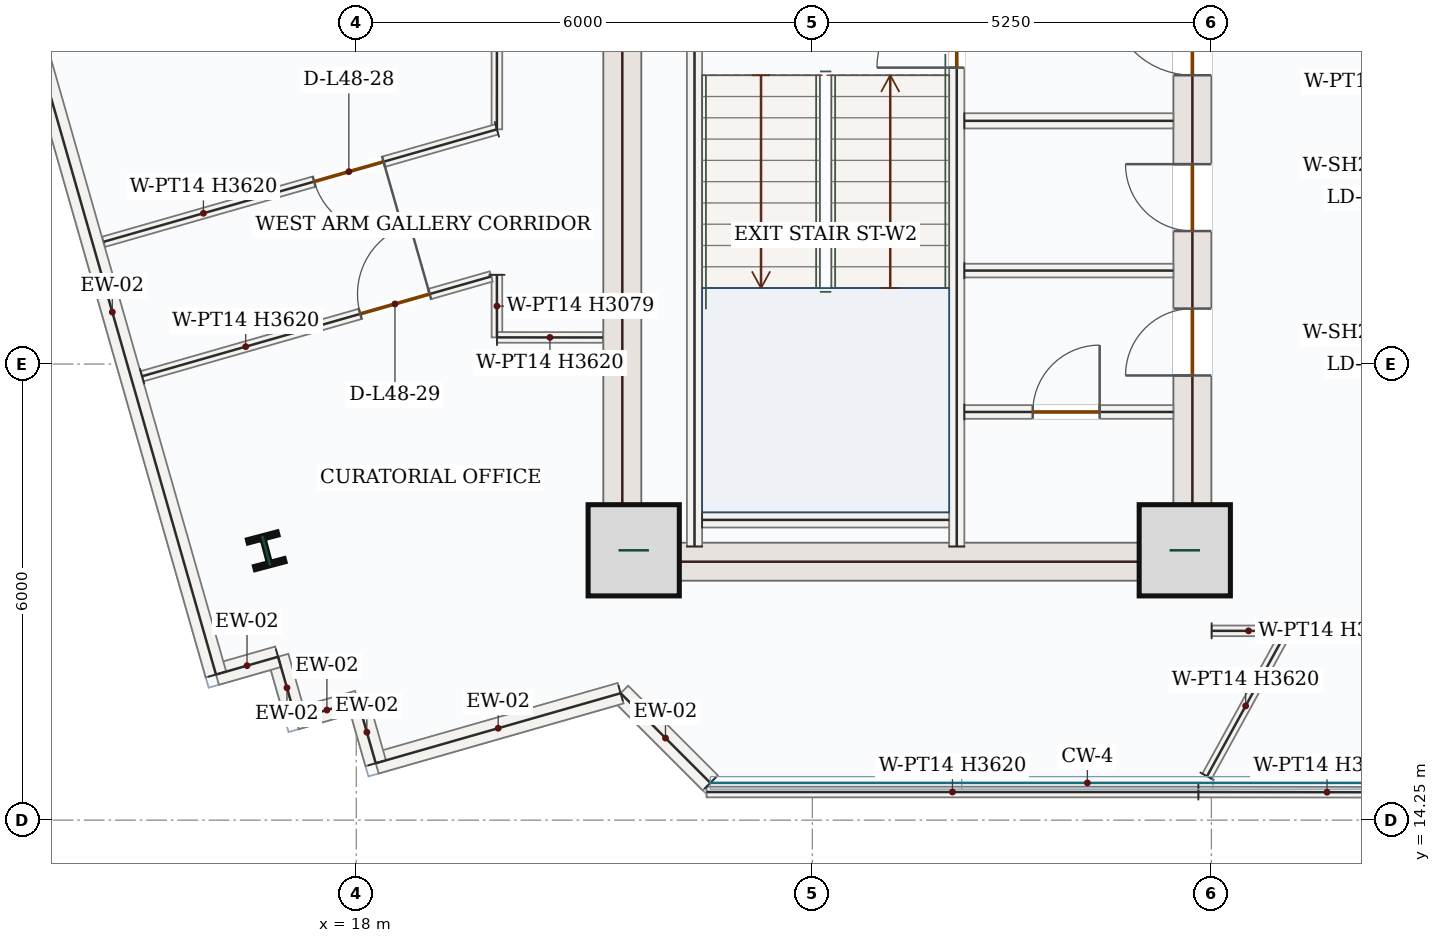
"""IFC4 building model, lengths in metres.
Left out: names, types, materials, properties, quantities, classifications, styles, units other than length and angle.
Written with IfcOpenShell. Run it as: python <this file> out.ifc"""

import sys

from ifc_helpers import new_model, si_unit, direction, frame, frame_2d, origin, origin_2d, place, context, subcontext, project, spatial, rectangle, i_section, extrude, source, transform, mapped, element, fill, save


model = new_model("IFC4")
c1 = context("Model", 3, precision=1e-05, world=origin(), true_north=direction((0.0, 1.0)))
c2 = subcontext(c1, "Body", "Model", "MODEL_VIEW")
j1 = project(units=[si_unit("LENGTHUNIT", "METRE"), si_unit("PLANEANGLEUNIT", "RADIAN")], contexts=[c1])
p1 = place(None, origin())
s1 = spatial("IfcSite", under=j1, at=p1, CompositionType="ELEMENT")
p2 = place(p1, origin())
s2 = spatial("IfcBuilding", under=s1, at=p2, CompositionType="ELEMENT")
p3 = place(p2, frame((0.0, 0.0, 205.8)))
s3 = spatial("IfcBuildingStorey", under=s2, at=p3, CompositionType="ELEMENT", Elevation=205.8)
m1 = source(origin(), c2, "Body", "SweptSolid", [
    extrude(rectangle(XDim=8.55, YDim=0.5, at=frame_2d((4.275, 0.0))), origin(), (0.0, 0.0, 1.0), 3.62),
])
p4 = place(p3, frame((21.5, 17.4, 0.0), z_axis=(0.0, 0.0, 1.0), x_axis=(0.0, 1.0, 0.0)))
e1 = element("IfcWall", 1, at=p4, inside=s3, PredefinedType="SHEAR", context=c2, shape_type="MappedRepresentation", body=[
    mapped(m1, transform((0.0, 0.0, 0.0), x_axis=(1.0, 0.0, 0.0), y_axis=(0.0, 1.0, 0.0), z_axis=(0.0, 0.0, 1.0), scale=1.0)),
])
p5 = place(p3, frame((29.0, 17.4, 0.0), z_axis=(0.0, 0.0, 1.0), x_axis=(0.0, 1.0, 0.0)))
e2 = element("IfcWall", 2, at=p5, inside=s3, PredefinedType="SHEAR", context=c2, shape_type="SweptSolid", body=[
    extrude(rectangle(XDim=8.55, YDim=0.5, at=frame_2d((4.275, 0.0))), origin(), (0.0, 0.0, 1.0), 3.62),
])
p6 = place(p5, frame((6.65, 0.0, 0.0)))
e3 = element("IfcOpeningElement", 3, at=p6, cuts=e2, PredefinedType="OPENING", context=c2, shape_type="SweptSolid", body=[
    extrude(rectangle(XDim=1.1, YDim=2.2, at=frame_2d((0.55, 1.1))), frame((0.0, 0.26, 0.0), z_axis=(0.0, -1.0, 0.0), x_axis=(1.0, 0.0, 0.0)), (0.0, 0.0, 1.0), 0.52),
])
p7 = place(p5, frame((2.7, 0.0, 0.0)))
e4 = element("IfcOpeningElement", 4, at=p7, cuts=e2, PredefinedType="OPENING", context=c2, shape_type="SweptSolid", body=[
    extrude(rectangle(XDim=0.88, YDim=2.1, at=frame_2d((0.44, 1.05))), frame((0.0, 0.26, 0.0), z_axis=(0.0, -1.0, 0.0), x_axis=(1.0, 0.0, 0.0)), (0.0, 0.0, 1.0), 0.52),
])
p8 = place(p5, frame((4.6, 0.0, 0.0)))
e5 = element("IfcOpeningElement", 5, at=p8, cuts=e2, PredefinedType="OPENING", context=c2, shape_type="SweptSolid", body=[
    extrude(rectangle(XDim=0.88, YDim=2.1, at=frame_2d((0.44, 1.05))), frame((0.0, 0.26, 0.0), z_axis=(0.0, -1.0, 0.0), x_axis=(1.0, 0.0, 0.0)), (0.0, 0.0, 1.0), 0.52),
])
m2 = source(origin(), c2, "Body", "SweptSolid", [
    extrude(rectangle(XDim=7.0, YDim=0.5, at=frame_2d((3.5, 0.0))), origin(), (0.0, 0.0, 1.0), 3.62),
])
p9 = place(p3, frame((21.75, 17.65, 0.0), z_axis=(0.0, 0.0, 1.0), x_axis=(1.0, 0.0, 0.0)))
e6 = element("IfcWall", 6, at=p9, inside=s3, PredefinedType="SHEAR", context=c2, shape_type="MappedRepresentation", body=[
    mapped(m2, transform((0.0, 0.0, 0.0), x_axis=(1.0, 0.0, 0.0), y_axis=(0.0, 1.0, 0.0), z_axis=(0.0, 0.0, 1.0), scale=1.0)),
])
m3 = source(origin(), c2, "Body", "SweptSolid", [
    extrude(rectangle(XDim=1.2, YDim=1.2, at=origin_2d()), origin(), (0.0, 0.0, 1.0), 3.9),
])
for number, where, z_axis, x_axis in (
    (7, (21.65, 17.8, 0.0), (0.0, 0.0, 1.0), (1.0, 0.0, 0.0)),
    (8, (28.9, 17.8, 0.0), (0.0, 0.0, 1.0), (1.0, 0.0, 0.0)),
):
    element("IfcColumn", number, at=place(p3, frame(where, z_axis=z_axis, x_axis=x_axis)), inside=s3, PredefinedType="COLUMN", context=c2, shape_type="MappedRepresentation", body=[
        mapped(m3, transform((0.0, 0.0, 0.0), x_axis=(1.0, 0.0, 0.0), y_axis=(0.0, 1.0, 0.0), z_axis=(0.0, 0.0, 1.0), scale=1.0)),
    ])
m4 = source(origin(), c2, "Body", "SweptSolid", [
    extrude(i_section(OverallWidth=0.404, OverallDepth=0.407, WebThickness=0.027, FlangeThickness=0.044, FilletRadius=0.018, at=origin_2d()), origin(), (0.0, 0.0, 1.0), 3.9),
])
p10 = place(p3, frame((16.815, 17.794, 0.0), z_axis=(0.0, 0.0, 1.0), x_axis=(0.966823388604, 0.255445757936, 0.0)))
e9 = element("IfcColumn", 9, at=p10, inside=s3, PredefinedType="COLUMN", context=c2, shape_type="MappedRepresentation", body=[
    mapped(m4, transform((0.0, 0.0, 0.0), x_axis=(1.0, 0.0, 0.0), y_axis=(0.0, 1.0, 0.0), z_axis=(0.0, 0.0, 1.0), scale=1.0)),
])
m5 = source(origin(), c2, "Body", "SweptSolid", [
    extrude(rectangle(XDim=1.669, YDim=0.28, at=frame_2d((0.834, 0.0))), origin(), (0.0, 0.0, 1.0), 3.62),
])
p11 = place(p3, frame((22.658, 14.74, 0.0), z_axis=(0.0, 0.0, 1.0), x_axis=(-0.707106781187, 0.707106781187, 0.0)))
e10 = element("IfcWall", 10, at=p11, inside=s3, PredefinedType="SOLIDWALL", context=c2, shape_type="MappedRepresentation", body=[
    mapped(m5, transform((0.0, 0.0, 0.0), x_axis=(1.0, 0.0, 0.0), y_axis=(0.0, 1.0, 0.0), z_axis=(0.0, 0.0, 1.0), scale=1.0)),
])
m6 = source(origin(), c2, "Body", "SweptSolid", [
    extrude(rectangle(XDim=3.351, YDim=0.28, at=frame_2d((1.676, 0.0))), origin(), (0.0, 0.0, 1.0), 3.62),
])
p12 = place(p3, frame((21.478, 15.92, 0.0), z_axis=(0.0, 0.0, 1.0), x_axis=(-0.961438677319, -0.275019398869, 0.0)))
e11 = element("IfcWall", 11, at=p12, inside=s3, PredefinedType="SOLIDWALL", context=c2, shape_type="MappedRepresentation", body=[
    mapped(m6, transform((0.0, 0.0, 0.0), x_axis=(1.0, 0.0, 0.0), y_axis=(0.0, 1.0, 0.0), z_axis=(0.0, 0.0, 1.0), scale=1.0)),
])
m7 = source(origin(), c2, "Body", "SweptSolid", [
    extrude(rectangle(XDim=0.85, YDim=0.28, at=frame_2d((0.425, 0.0))), origin(), (0.0, 0.0, 1.0), 3.62),
])
p13 = place(p3, frame((18.256, 14.998, 0.0), z_axis=(0.0, 0.0, 1.0), x_axis=(-0.275100375961, 0.961415510144, 0.0)))
e12 = element("IfcWall", 12, at=p13, inside=s3, PredefinedType="SOLIDWALL", context=c2, shape_type="MappedRepresentation", body=[
    mapped(m7, transform((0.0, 0.0, 0.0), x_axis=(1.0, 0.0, 0.0), y_axis=(0.0, 1.0, 0.0), z_axis=(0.0, 0.0, 1.0), scale=1.0)),
])
m8 = source(origin(), c2, "Body", "SweptSolid", [
    extrude(rectangle(XDim=0.85, YDim=0.28, at=frame_2d((0.425, 0.0))), origin(), (0.0, 0.0, 1.0), 3.62),
])
p14 = place(p3, frame((18.022, 15.816, 0.0), z_axis=(0.0, 0.0, 1.0), x_axis=(-0.961393768724, -0.275176346112, 0.0)))
e13 = element("IfcWall", 13, at=p14, inside=s3, PredefinedType="SOLIDWALL", context=c2, shape_type="MappedRepresentation", body=[
    mapped(m8, transform((0.0, 0.0, 0.0), x_axis=(1.0, 0.0, 0.0), y_axis=(0.0, 1.0, 0.0), z_axis=(0.0, 0.0, 1.0), scale=1.0)),
])
p15 = place(p3, frame((17.205, 15.582, 0.0), z_axis=(0.0, 0.0, 1.0), x_axis=(-0.274834915789, 0.961491429532, 0.0)))
e14 = element("IfcWall", 14, at=p15, inside=s3, PredefinedType="SOLIDWALL", context=c2, shape_type="MappedRepresentation", body=[
    mapped(m7, transform((0.0, 0.0, 0.0), x_axis=(1.0, 0.0, 0.0), y_axis=(0.0, 1.0, 0.0), z_axis=(0.0, 0.0, 1.0), scale=1.0)),
])
p16 = place(p3, frame((16.971, 16.399, 0.0), z_axis=(0.0, 0.0, 1.0), x_axis=(-0.961393768724, -0.275176346112, 0.0)))
e15 = element("IfcWall", 15, at=p16, inside=s3, PredefinedType="SOLIDWALL", context=c2, shape_type="MappedRepresentation", body=[
    mapped(m8, transform((0.0, 0.0, 0.0), x_axis=(1.0, 0.0, 0.0), y_axis=(0.0, 1.0, 0.0), z_axis=(0.0, 0.0, 1.0), scale=1.0)),
])
m9 = source(origin(), c2, "Body", "SweptSolid", [
    extrude(rectangle(XDim=9.92, YDim=0.28, at=frame_2d((4.96, 0.0))), origin(), (0.0, 0.0, 1.0), 3.62),
])
p17 = place(p3, frame((16.154, 16.165, 0.0), z_axis=(0.0, 0.0, 1.0), x_axis=(-0.274971401171, 0.961452405758, 0.0)))
e16 = element("IfcWall", 16, at=p17, inside=s3, PredefinedType="SOLIDWALL", context=c2, shape_type="MappedRepresentation", body=[
    mapped(m9, transform((0.0, 0.0, 0.0), x_axis=(1.0, 0.0, 0.0), y_axis=(0.0, 1.0, 0.0), z_axis=(0.0, 0.0, 1.0), scale=1.0)),
])
m10 = source(origin(), c2, "Body", "SweptSolid", [
    extrude(rectangle(XDim=7.87, YDim=0.2, at=frame_2d((3.935, 0.0))), origin(), (0.0, 0.0, 1.0), 3.62),
])
p18 = place(p3, frame((22.45, 17.85, 0.0), z_axis=(0.0, 0.0, 1.0), x_axis=(0.0, 1.0, 0.0)))
e17 = element("IfcWall", 17, at=p18, inside=s3, PredefinedType="SOLIDWALL", context=c2, shape_type="MappedRepresentation", body=[
    mapped(m10, transform((0.0, 0.0, 0.0), x_axis=(1.0, 0.0, 0.0), y_axis=(0.0, 1.0, 0.0), z_axis=(0.0, 0.0, 1.0), scale=1.0)),
])
p19 = place(p3, frame((25.9, 17.85, 0.0), z_axis=(0.0, 0.0, 1.0), x_axis=(0.0, 1.0, 0.0)))
e18 = element("IfcWall", 18, at=p19, inside=s3, PredefinedType="SOLIDWALL", context=c2, shape_type="SweptSolid", body=[
    extrude(rectangle(XDim=8.0, YDim=0.2, at=frame_2d((4.0, 0.0))), origin(), (0.0, 0.0, 1.0), 3.62),
])
p20 = place(p19, frame((6.3, 0.0, 0.0)))
e19 = element("IfcOpeningElement", 19, at=p20, cuts=e18, PredefinedType="OPENING", context=c2, shape_type="SweptSolid", body=[
    extrude(rectangle(XDim=1.05, YDim=2.15, at=frame_2d((0.525, 1.075))), frame((0.0, 0.11, 0.0), z_axis=(0.0, -1.0, 0.0), x_axis=(1.0, 0.0, 0.0)), (0.0, 0.0, 1.0), 0.22),
])
m11 = source(origin(), c2, "Body", "SweptSolid", [
    extrude(rectangle(XDim=3.25, YDim=0.2, at=frame_2d((1.625, 0.0))), origin(), (0.0, 0.0, 1.0), 3.62),
])
p21 = place(p3, frame((22.55, 18.2, 0.0), z_axis=(0.0, 0.0, 1.0), x_axis=(1.0, 0.0, 0.0)))
e20 = element("IfcWall", 20, at=p21, inside=s3, PredefinedType="SOLIDWALL", context=c2, shape_type="MappedRepresentation", body=[
    mapped(m11, transform((0.0, 0.0, 0.0), x_axis=(1.0, 0.0, 0.0), y_axis=(0.0, 1.0, 0.0), z_axis=(0.0, 0.0, 1.0), scale=1.0)),
])
m12 = source(origin(), c2, "Body", "SweptSolid", [
    extrude(rectangle(XDim=2.75, YDim=0.2, at=frame_2d((1.375, 0.0))), origin(), (0.0, 0.0, 1.0), 3.62),
])
p22 = place(p3, frame((26.0, 23.45, 0.0), z_axis=(0.0, 0.0, 1.0), x_axis=(1.0, 0.0, 0.0)))
e21 = element("IfcWall", 21, at=p22, inside=s3, PredefinedType="SOLIDWALL", context=c2, shape_type="MappedRepresentation", body=[
    mapped(m12, transform((0.0, 0.0, 0.0), x_axis=(1.0, 0.0, 0.0), y_axis=(0.0, 1.0, 0.0), z_axis=(0.0, 0.0, 1.0), scale=1.0)),
])
p23 = place(p3, frame((26.0, 19.62, 0.0), z_axis=(0.0, 0.0, 1.0), x_axis=(1.0, 0.0, 0.0)))
e22 = element("IfcWall", 22, at=p23, inside=s3, PredefinedType="PARTITIONING", context=c2, shape_type="SweptSolid", body=[
    extrude(rectangle(XDim=2.75, YDim=0.18, at=frame_2d((1.375, 0.0))), origin(), (0.0, 0.0, 1.0), 3.62),
])
p24 = place(p23, frame((0.9, 0.0, 0.0)))
e23 = element("IfcOpeningElement", 23, at=p24, cuts=e22, PredefinedType="OPENING", context=c2, shape_type="SweptSolid", body=[
    extrude(rectangle(XDim=0.88, YDim=2.1, at=frame_2d((0.44, 1.05))), frame((0.0, 0.1, 0.0), z_axis=(0.0, -1.0, 0.0), x_axis=(1.0, 0.0, 0.0)), (0.0, 0.0, 1.0), 0.2),
])
m13 = source(origin(), c2, "Body", "SweptSolid", [
    extrude(rectangle(XDim=2.75, YDim=0.18, at=frame_2d((1.375, 0.0))), origin(), (0.0, 0.0, 1.0), 3.62),
])
p25 = place(p3, frame((26.0, 21.48, 0.0), z_axis=(0.0, 0.0, 1.0), x_axis=(1.0, 0.0, 0.0)))
e24 = element("IfcWall", 24, at=p25, inside=s3, PredefinedType="PARTITIONING", context=c2, shape_type="MappedRepresentation", body=[
    mapped(m13, transform((0.0, 0.0, 0.0), x_axis=(1.0, 0.0, 0.0), y_axis=(0.0, 1.0, 0.0), z_axis=(0.0, 0.0, 1.0), scale=1.0)),
])
p26 = place(p3, frame((30.225, 16.74, 0.0), z_axis=(0.0, 0.0, 1.0), x_axis=(1.0, 0.0, 0.0)))
e25 = element("IfcWall", 25, at=p26, inside=s3, PredefinedType="PARTITIONING", context=c2, shape_type="SweptSolid", body=[
    extrude(rectangle(XDim=7.753, YDim=0.14, at=frame_2d((3.876, 0.0))), origin(), (0.0, 0.0, 1.0), 3.62),
])
p27 = place(p26, frame((5.306, 0.0, 0.0)))
e26 = element("IfcOpeningElement", 26, at=p27, cuts=e25, PredefinedType="OPENING", context=c2, shape_type="SweptSolid", body=[
    extrude(rectangle(XDim=0.95, YDim=2.15, at=frame_2d((0.475, 1.075))), frame((0.0, 0.08, 0.0), z_axis=(0.0, -1.0, 0.0), x_axis=(1.0, 0.0, 0.0)), (0.0, 0.0, 1.0), 0.16),
])
m14 = source(origin(), c2, "Body", "SweptSolid", [
    extrude(rectangle(XDim=3.385, YDim=0.14, at=frame_2d((1.693, 0.0))), origin(), (0.0, 0.0, 1.0), 3.62),
])
p28 = place(p3, frame((32.464, 14.615, 0.0), z_axis=(0.0, 0.0, 1.0), x_axis=(-0.999999061333, 0.001370158085, 0.0)))
e27 = element("IfcWall", 27, at=p28, inside=s3, PredefinedType="PARTITIONING", context=c2, shape_type="MappedRepresentation", body=[
    mapped(m14, transform((0.0, 0.0, 0.0), x_axis=(1.0, 0.0, 0.0), y_axis=(0.0, 1.0, 0.0), z_axis=(0.0, 0.0, 1.0), scale=1.0)),
])
m15 = source(origin(), c2, "Body", "SweptSolid", [
    extrude(rectangle(XDim=2.111, YDim=0.14, at=frame_2d((1.056, 0.0))), origin(), (0.0, 0.0, 1.0), 3.62),
])
p29 = place(p3, frame((29.193, 14.827, 0.0), z_axis=(0.0, 0.0, 1.0), x_axis=(0.481297142313, 0.876557505702, 0.0)))
e28 = element("IfcWall", 28, at=p29, inside=s3, PredefinedType="PARTITIONING", context=c2, shape_type="MappedRepresentation", body=[
    mapped(m15, transform((0.0, 0.0, 0.0), x_axis=(1.0, 0.0, 0.0), y_axis=(0.0, 1.0, 0.0), z_axis=(0.0, 0.0, 1.0), scale=1.0)),
])
m16 = source(origin(), c2, "Body", "SweptSolid", [
    extrude(rectangle(XDim=10.061, YDim=0.14, at=frame_2d((5.031, 0.0))), origin(), (0.0, 0.0, 1.0), 2.693),
])
p30 = place(p3, frame((19.854, 33.399, 0.0), z_axis=(0.0, 0.0, 1.0), x_axis=(-0.000363980467, -0.999999933759, 0.0)))
e29 = element("IfcWall", 29, at=p30, inside=s3, PredefinedType="PARTITIONING", context=c2, shape_type="MappedRepresentation", body=[
    mapped(m16, transform((0.0, 0.0, 0.0), x_axis=(1.0, 0.0, 0.0), y_axis=(0.0, 1.0, 0.0), z_axis=(0.0, 0.0, 1.0), scale=1.0)),
])
p31 = place(p3, frame((19.85, 23.338, 0.0), z_axis=(0.0, 0.0, 1.0), x_axis=(-0.961455430103, -0.274960826164, 0.0)))
e30 = element("IfcWall", 30, at=p31, inside=s3, PredefinedType="PARTITIONING", context=c2, shape_type="SweptSolid", body=[
    extrude(rectangle(XDim=5.381, YDim=0.14, at=frame_2d((2.69, 0.0))), origin(), (0.0, 0.0, 1.0), 3.62),
])
p32 = place(p31, frame((1.551, 0.0, 0.0)))
e31 = element("IfcOpeningElement", 31, at=p32, cuts=e30, PredefinedType="OPENING", context=c2, shape_type="SweptSolid", body=[
    extrude(rectangle(XDim=0.95, YDim=2.15, at=frame_2d((0.475, 1.075))), frame((0.0, 0.08, 0.0), z_axis=(0.0, -1.0, 0.0), x_axis=(1.0, 0.0, 0.0)), (0.0, 0.0, 1.0), 0.16),
])
m17 = source(origin(), c2, "Body", "SweptSolid", [
    extrude(rectangle(XDim=0.823, YDim=0.14, at=frame_2d((0.412, 0.0))), origin(), (0.0, 0.0, 1.0), 3.079),
])
p33 = place(p3, frame((19.85, 21.424, 0.0), z_axis=(0.0, 0.0, 1.0), x_axis=(0.001186238786, -0.999999296419, 0.0)))
e32 = element("IfcWall", 32, at=p33, inside=s3, PredefinedType="PARTITIONING", context=c2, shape_type="MappedRepresentation", body=[
    mapped(m17, transform((0.0, 0.0, 0.0), x_axis=(1.0, 0.0, 0.0), y_axis=(0.0, 1.0, 0.0), z_axis=(0.0, 0.0, 1.0), scale=1.0)),
])
m18 = source(origin(), c2, "Body", "SweptSolid", [
    extrude(rectangle(XDim=1.394, YDim=0.14, at=frame_2d((0.697, 0.0))), origin(), (0.0, 0.0, 1.0), 3.62),
])
p34 = place(p3, frame((19.851, 20.601, 0.0), z_axis=(0.0, 0.0, 1.0), x_axis=(0.999999754632, -0.000700525222, 0.0)))
e33 = element("IfcWall", 33, at=p34, inside=s3, PredefinedType="PARTITIONING", context=c2, shape_type="MappedRepresentation", body=[
    mapped(m18, transform((0.0, 0.0, 0.0), x_axis=(1.0, 0.0, 0.0), y_axis=(0.0, 1.0, 0.0), z_axis=(0.0, 0.0, 1.0), scale=1.0)),
])
m19 = source(origin(), c2, "Body", "SweptSolid", [
    extrude(rectangle(XDim=0.971, YDim=0.14, at=frame_2d((0.486, 0.0))), origin(), (0.0, 0.0, 1.0), 3.62),
])
p35 = place(p3, frame((29.253, 16.74, 0.0), z_axis=(0.0, 0.0, 1.0), x_axis=(0.999999873614, -0.000502765145, 0.0)))
e34 = element("IfcWall", 34, at=p35, inside=s3, PredefinedType="PARTITIONING", context=c2, shape_type="MappedRepresentation", body=[
    mapped(m19, transform((0.0, 0.0, 0.0), x_axis=(1.0, 0.0, 0.0), y_axis=(0.0, 1.0, 0.0), z_axis=(0.0, 0.0, 1.0), scale=1.0)),
])
m20 = source(origin(), c2, "Body", "SweptSolid", [
    extrude(rectangle(XDim=6.47, YDim=0.14, at=frame_2d((3.235, 0.0))), origin(), (0.0, 0.0, 1.0), 3.62),
])
p36 = place(p3, frame((29.079, 14.62, 0.0), z_axis=(0.0, 0.0, 1.0), x_axis=(-1.0, 0.0, 0.0)))
e35 = element("IfcWall", 35, at=p36, inside=s3, PredefinedType="PARTITIONING", context=c2, shape_type="MappedRepresentation", body=[
    mapped(m20, transform((0.0, 0.0, 0.0), x_axis=(1.0, 0.0, 0.0), y_axis=(0.0, 1.0, 0.0), z_axis=(0.0, 0.0, 1.0), scale=1.0)),
])
p37 = place(p3, frame((15.183, 20.09, 0.0), z_axis=(0.0, 0.0, 1.0), x_axis=(0.961460270043, 0.274943901784, 0.0)))
e36 = element("IfcWall", 36, at=p37, inside=s3, PredefinedType="PARTITIONING", context=c2, shape_type="SweptSolid", body=[
    extrude(rectangle(XDim=4.776, YDim=0.14, at=frame_2d((2.388, 0.0))), origin(), (0.0, 0.0, 1.0), 3.62),
])
p38 = place(p37, frame((2.985, 0.0, 0.0)))
e37 = element("IfcOpeningElement", 37, at=p38, cuts=e36, PredefinedType="OPENING", context=c2, shape_type="SweptSolid", body=[
    extrude(rectangle(XDim=0.95, YDim=2.15, at=frame_2d((0.475, 1.075))), frame((0.0, 0.08, 0.0), z_axis=(0.0, -1.0, 0.0), x_axis=(1.0, 0.0, 0.0)), (0.0, 0.0, 1.0), 0.16),
])
m21 = source(origin(), c2, "Body", "SweptSolid", [
    extrude(rectangle(XDim=1.05, YDim=2.15, at=frame_2d((0.525, 1.075))), frame((0.0, 0.025, 0.0), z_axis=(0.0, -1.0, 0.0), x_axis=(1.0, 0.0, 0.0)), (0.0, 0.0, 1.0), 0.05),
])
p39 = place(p20, origin())
e38 = element("IfcDoor", 38, at=p39, inside=s3, OperationType="SINGLE_SWING_LEFT", PredefinedType="DOOR", context=c2, shape_type="MappedRepresentation", body=[
    mapped(m21, transform((0.0, 0.0, 0.0), x_axis=(1.0, 0.0, 0.0), y_axis=(0.0, 1.0, 0.0), z_axis=(0.0, 0.0, 1.0), scale=1.0)),
])
fill(e19, e38)
m22 = source(origin(), c2, "Body", "SweptSolid", [
    extrude(rectangle(XDim=1.1, YDim=2.2, at=frame_2d((0.55, 1.1))), frame((0.0, 0.025, 0.0), z_axis=(0.0, -1.0, 0.0), x_axis=(1.0, 0.0, 0.0)), (0.0, 0.0, 1.0), 0.05),
])
p40 = place(p6, origin())
e39 = element("IfcDoor", 39, at=p40, inside=s3, OperationType="SINGLE_SWING_RIGHT", PredefinedType="DOOR", context=c2, shape_type="MappedRepresentation", body=[
    mapped(m22, transform((0.0, 0.0, 0.0), x_axis=(1.0, 0.0, 0.0), y_axis=(0.0, 1.0, 0.0), z_axis=(0.0, 0.0, 1.0), scale=1.0)),
])
fill(e3, e39)
m23 = source(origin(), c2, "Body", "SweptSolid", [
    extrude(rectangle(XDim=0.88, YDim=2.1, at=frame_2d((0.44, 1.05))), frame((0.0, 0.025, 0.0), z_axis=(0.0, -1.0, 0.0), x_axis=(1.0, 0.0, 0.0)), (0.0, 0.0, 1.0), 0.05),
])
p41 = place(p24, origin())
e40 = element("IfcDoor", 40, at=p41, inside=s3, OperationType="SINGLE_SWING_RIGHT", PredefinedType="DOOR", context=c2, shape_type="MappedRepresentation", body=[
    mapped(m23, transform((0.0, 0.0, 0.0), x_axis=(1.0, 0.0, 0.0), y_axis=(0.0, 1.0, 0.0), z_axis=(0.0, 0.0, 1.0), scale=1.0)),
])
fill(e23, e40)
p42 = place(p7, origin())
e41 = element("IfcDoor", 41, at=p42, inside=s3, OperationType="SINGLE_SWING_LEFT", PredefinedType="DOOR", context=c2, shape_type="MappedRepresentation", body=[
    mapped(m23, transform((0.0, 0.0, 0.0), x_axis=(1.0, 0.0, 0.0), y_axis=(0.0, 1.0, 0.0), z_axis=(0.0, 0.0, 1.0), scale=1.0)),
])
fill(e4, e41)
p43 = place(p8, origin())
e42 = element("IfcDoor", 42, at=p43, inside=s3, OperationType="SINGLE_SWING_RIGHT", PredefinedType="DOOR", context=c2, shape_type="MappedRepresentation", body=[
    mapped(m23, transform((0.0, 0.0, 0.0), x_axis=(1.0, 0.0, 0.0), y_axis=(0.0, 1.0, 0.0), z_axis=(0.0, 0.0, 1.0), scale=1.0)),
])
fill(e5, e42)
m24 = source(origin(), c2, "Body", "SweptSolid", [
    extrude(rectangle(XDim=0.95, YDim=2.15, at=frame_2d((0.475, 1.075))), frame((0.0, 0.025, 0.0), z_axis=(0.0, -1.0, 0.0), x_axis=(1.0, 0.0, 0.0)), (0.0, 0.0, 1.0), 0.05),
])
p44 = place(p32, origin())
e43 = element("IfcDoor", 43, at=p44, inside=s3, OperationType="SINGLE_SWING_LEFT", PredefinedType="DOOR", context=c2, shape_type="MappedRepresentation", body=[
    mapped(m24, transform((0.0, 0.0, 0.0), x_axis=(1.0, 0.0, 0.0), y_axis=(0.0, 1.0, 0.0), z_axis=(0.0, 0.0, 1.0), scale=1.0)),
])
fill(e31, e43)
p45 = place(p38, origin())
e44 = element("IfcDoor", 44, at=p45, inside=s3, OperationType="SINGLE_SWING_RIGHT", PredefinedType="DOOR", context=c2, shape_type="MappedRepresentation", body=[
    mapped(m24, transform((0.0, 0.0, 0.0), x_axis=(1.0, 0.0, 0.0), y_axis=(0.0, 1.0, 0.0), z_axis=(0.0, 0.0, 1.0), scale=1.0)),
])
fill(e37, e44)
save(model, sys.argv[1])
